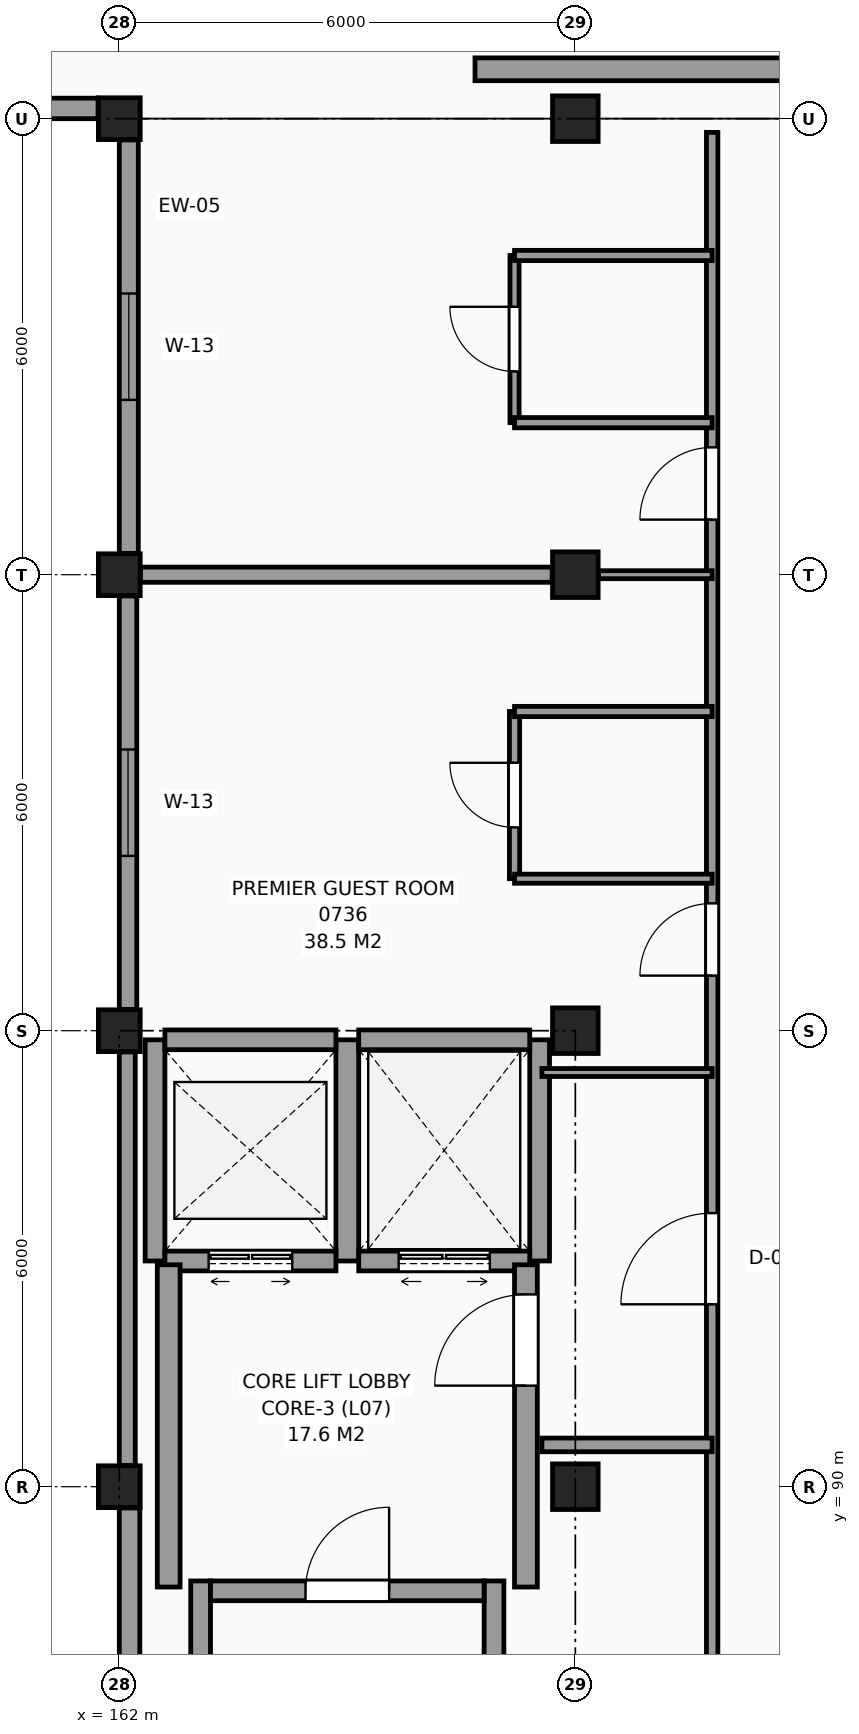
"""IFC4 building model, lengths in metres.
Left out: names, types, materials, properties, quantities, classifications, styles, units other than length and angle.
Written with IfcOpenShell. Run it as: python <this file> out.ifc"""

import sys

from ifc_helpers import new_model, si_unit, direction, frame, frame_2d, origin, origin_2d, place, context, subcontext, project, spatial, rectangle, extrude, element, fill, save


model = new_model("IFC4")
c1 = context("Model", 3, precision=1e-05, world=origin(), true_north=direction((0.0, 1.0)))
c2 = subcontext(c1, "Body", "Model", "MODEL_VIEW")
j1 = project(units=[si_unit("LENGTHUNIT", "METRE"), si_unit("PLANEANGLEUNIT", "RADIAN")], contexts=[c1])
p1 = place(None, origin())
s1 = spatial("IfcSite", under=j1, at=p1, CompositionType="ELEMENT")
p2 = place(p1, origin())
s2 = spatial("IfcBuilding", under=s1, at=p2, CompositionType="ELEMENT")
p3 = place(p2, frame((0.0, 0.0, 31.5)))
s3 = spatial("IfcBuildingStorey", under=s2, at=p3, CompositionType="ELEMENT", Elevation=31.5)
for number, where, z_axis, x_axis in (
    (1, (162.0, 90.0, 0.0), (0.0, 0.0, 1.0), (1.0, 0.0, 0.0)),
    (2, (162.0, 96.0, 0.0), (0.0, 0.0, 1.0), (1.0, 0.0, 0.0)),
    (3, (162.0, 102.0, 0.0), (0.0, 0.0, 1.0), (1.0, 0.0, 0.0)),
    (4, (162.0, 108.0, 0.0), (0.0, 0.0, 1.0), (1.0, 0.0, 0.0)),
):
    element("IfcColumn", number, at=place(p3, frame(where, z_axis=z_axis, x_axis=x_axis)), inside=s3, PredefinedType="COLUMN", context=c2, shape_type="SweptSolid", body=[
        extrude(rectangle(XDim=0.55, YDim=0.55, at=origin_2d()), origin(), (0.0, 0.0, 1.0), 3.3),
    ])
for number, where, z_axis, x_axis in (
    (5, (168.0, 90.0, 0.0), (0.0, 0.0, 1.0), (1.0, 0.0, 0.0)),
    (6, (168.0, 96.0, 0.0), (0.0, 0.0, 1.0), (1.0, 0.0, 0.0)),
    (7, (168.0, 102.0, 0.0), (0.0, 0.0, 1.0), (1.0, 0.0, 0.0)),
    (8, (168.0, 108.0, 0.0), (0.0, 0.0, 1.0), (1.0, 0.0, 0.0)),
):
    element("IfcColumn", number, at=place(p3, frame(where, z_axis=z_axis, x_axis=x_axis)), inside=s3, PredefinedType="COLUMN", context=c2, shape_type="SweptSolid", body=[
        extrude(rectangle(XDim=0.6, YDim=0.6, at=origin_2d()), origin(), (0.0, 0.0, 1.0), 3.3),
    ])
p4 = place(p3, frame((156.305, 108.135, 0.0), z_axis=(0.0, 0.0, 1.0), x_axis=(1.0, 0.0, 0.0)))
e9 = element("IfcWall", 9, at=p4, inside=s3, PredefinedType="SOLIDWALL", context=c2, shape_type="SweptSolid", body=[
    extrude(rectangle(XDim=5.415, YDim=0.27, at=frame_2d((2.708, 0.0))), origin(), (0.0, 0.0, 1.0), 3.07),
])
p5 = place(p3, frame((162.125, 107.72, 0.0), z_axis=(0.0, 0.0, 1.0), x_axis=(0.0, -1.0, 0.0)))
e10 = element("IfcWall", 10, at=p5, inside=s3, PredefinedType="SOLIDWALL", context=c2, shape_type="SweptSolid", body=[
    extrude(rectangle(XDim=5.44, YDim=0.25, at=frame_2d((2.72, 0.0))), origin(), (0.0, 0.0, 1.0), 2.42),
])
p6 = place(p5, frame((2.02, 0.0, 0.8)))
e11 = element("IfcOpeningElement", 11, at=p6, cuts=e10, PredefinedType="OPENING", context=c2, shape_type="SweptSolid", body=[
    extrude(rectangle(XDim=1.4, YDim=1.4, at=frame_2d((0.7, 0.7))), frame((0.0, 0.135, 0.0), z_axis=(0.0, -1.0, 0.0), x_axis=(1.0, 0.0, 0.0)), (0.0, 0.0, 1.0), 0.27),
])
p7 = place(p3, frame((162.115, 101.72, 0.0), z_axis=(0.0, 0.0, 1.0), x_axis=(0.0, -1.0, 0.0)))
e12 = element("IfcWall", 12, at=p7, inside=s3, PredefinedType="SOLIDWALL", context=c2, shape_type="SweptSolid", body=[
    extrude(rectangle(XDim=5.44, YDim=0.23, at=frame_2d((2.72, 0.0))), origin(), (0.0, 0.0, 1.0), 2.42),
])
p8 = place(p7, frame((2.02, 0.0, 0.8)))
e13 = element("IfcOpeningElement", 13, at=p8, cuts=e12, PredefinedType="OPENING", context=c2, shape_type="SweptSolid", body=[
    extrude(rectangle(XDim=1.4, YDim=1.4, at=frame_2d((0.7, 0.7))), frame((0.0, 0.125, 0.0), z_axis=(0.0, -1.0, 0.0), x_axis=(1.0, 0.0, 0.0)), (0.0, 0.0, 1.0), 0.25),
])
p9 = place(p3, frame((162.105, 95.72, 0.0), z_axis=(0.0, 0.0, 1.0), x_axis=(0.0, -1.0, 0.0)))
e14 = element("IfcWall", 14, at=p9, inside=s3, PredefinedType="SOLIDWALL", context=c2, shape_type="SweptSolid", body=[
    extrude(rectangle(XDim=5.44, YDim=0.21, at=frame_2d((2.72, 0.0))), origin(), (0.0, 0.0, 1.0), 2.42),
])
p10 = place(p3, frame((162.135, 89.72, 0.0), z_axis=(0.0, 0.0, 1.0), x_axis=(0.0, -1.0, 0.0)))
e15 = element("IfcWall", 15, at=p10, inside=s3, PredefinedType="SOLIDWALL", context=c2, shape_type="SweptSolid", body=[
    extrude(rectangle(XDim=5.44, YDim=0.27, at=frame_2d((2.72, 0.0))), origin(), (0.0, 0.0, 1.0), 2.42),
])
p11 = place(p3, frame((166.68, 108.65, 0.0), z_axis=(0.0, 0.0, 1.0), x_axis=(1.0, 0.0, 0.0)))
e16 = element("IfcWall", 16, at=p11, inside=s3, PredefinedType="SHEAR", context=c2, shape_type="SweptSolid", body=[
    extrude(rectangle(XDim=4.24, YDim=0.3, at=frame_2d((2.12, 0.0))), origin(), (0.0, 0.0, 1.0), 3.3),
])
for number, where, z_axis, x_axis in (
    (17, (163.07, 78.04, 0.0), (0.0, 0.0, 1.0), (0.0, 1.0, 0.0)),
    (18, (166.93, 78.04, 0.0), (0.0, 0.0, 1.0), (0.0, 1.0, 0.0)),
):
    element("IfcWall", number, at=place(p3, frame(where, z_axis=z_axis, x_axis=x_axis)), inside=s3, PredefinedType="SHEAR", context=c2, shape_type="SweptSolid", body=[
        extrude(rectangle(XDim=10.72, YDim=0.26, at=frame_2d((5.36, 0.0))), origin(), (0.0, 0.0, 1.0), 3.3),
    ])
p12 = place(p3, frame((163.2, 88.63, 0.0), z_axis=(0.0, 0.0, 1.0), x_axis=(1.0, 0.0, 0.0)))
e19 = element("IfcWall", 19, at=p12, inside=s3, PredefinedType="SHEAR", context=c2, shape_type="SweptSolid", body=[
    extrude(rectangle(XDim=3.6, YDim=0.26, at=frame_2d((1.8, 0.0))), origin(), (0.0, 0.0, 1.0), 3.3),
])
p13 = place(p12, frame((1.25, 0.0, 0.0)))
e20 = element("IfcOpeningElement", 20, at=p13, cuts=e19, PredefinedType="OPENING", context=c2, shape_type="SweptSolid", body=[
    extrude(rectangle(XDim=1.1, YDim=2.15, at=frame_2d((0.55, 1.075))), frame((0.0, 0.14, 0.0), z_axis=(0.0, -1.0, 0.0), x_axis=(1.0, 0.0, 0.0)), (0.0, 0.0, 1.0), 0.28),
])
p14 = place(p3, frame((162.47, 92.97, 0.0), z_axis=(0.0, 0.0, 1.0), x_axis=(0.0, 1.0, 0.0)))
e21 = element("IfcWall", 21, at=p14, inside=s3, PredefinedType="SHEAR", context=c2, shape_type="SweptSolid", body=[
    extrude(rectangle(XDim=2.91, YDim=0.26, at=frame_2d((1.455, 0.0))), origin(), (0.0, 0.0, 1.0), 3.3),
])
p15 = place(p3, frame((165.0, 92.97, 0.0), z_axis=(0.0, 0.0, 1.0), x_axis=(0.0, 1.0, 0.0)))
e22 = element("IfcWall", 22, at=p15, inside=s3, PredefinedType="SHEAR", context=c2, shape_type="SweptSolid", body=[
    extrude(rectangle(XDim=2.91, YDim=0.3, at=frame_2d((1.455, 0.0))), origin(), (0.0, 0.0, 1.0), 3.3),
])
p16 = place(p3, frame((162.6, 95.88, 0.0), z_axis=(0.0, 0.0, 1.0), x_axis=(1.0, 0.0, 0.0)))
e23 = element("IfcWall", 23, at=p16, inside=s3, PredefinedType="SHEAR", context=c2, shape_type="SweptSolid", body=[
    extrude(rectangle(XDim=2.25, YDim=0.26, at=frame_2d((1.125, 0.0))), origin(), (0.0, 0.0, 1.0), 3.3),
])
p17 = place(p3, frame((162.6, 92.97, 0.0), z_axis=(0.0, 0.0, 1.0), x_axis=(1.0, 0.0, 0.0)))
e24 = element("IfcWall", 24, at=p17, inside=s3, PredefinedType="SHEAR", context=c2, shape_type="SweptSolid", body=[
    extrude(rectangle(XDim=2.25, YDim=0.26, at=frame_2d((1.125, 0.0))), origin(), (0.0, 0.0, 1.0), 3.3),
])
p18 = place(p17, frame((0.575, 0.0, 0.0)))
e25 = element("IfcOpeningElement", 25, at=p18, cuts=e24, PredefinedType="OPENING", context=c2, shape_type="SweptSolid", body=[
    extrude(rectangle(XDim=1.1, YDim=2.2, at=frame_2d((0.55, 1.1))), frame((0.0, 0.14, 0.0), z_axis=(0.0, -1.0, 0.0), x_axis=(1.0, 0.0, 0.0)), (0.0, 0.0, 1.0), 0.28),
])
p19 = place(p3, frame((167.53, 92.97, 0.0), z_axis=(0.0, 0.0, 1.0), x_axis=(0.0, 1.0, 0.0)))
e26 = element("IfcWall", 26, at=p19, inside=s3, PredefinedType="SHEAR", context=c2, shape_type="SweptSolid", body=[
    extrude(rectangle(XDim=2.91, YDim=0.26, at=frame_2d((1.455, 0.0))), origin(), (0.0, 0.0, 1.0), 3.3),
])
p20 = place(p3, frame((165.15, 95.88, 0.0), z_axis=(0.0, 0.0, 1.0), x_axis=(1.0, 0.0, 0.0)))
e27 = element("IfcWall", 27, at=p20, inside=s3, PredefinedType="SHEAR", context=c2, shape_type="SweptSolid", body=[
    extrude(rectangle(XDim=2.25, YDim=0.26, at=frame_2d((1.125, 0.0))), origin(), (0.0, 0.0, 1.0), 3.3),
])
p21 = place(p3, frame((165.15, 92.97, 0.0), z_axis=(0.0, 0.0, 1.0), x_axis=(1.0, 0.0, 0.0)))
e28 = element("IfcWall", 28, at=p21, inside=s3, PredefinedType="SHEAR", context=c2, shape_type="SweptSolid", body=[
    extrude(rectangle(XDim=2.25, YDim=0.26, at=frame_2d((1.125, 0.0))), origin(), (0.0, 0.0, 1.0), 3.3),
])
p22 = place(p21, frame((0.525, 0.0, 0.0)))
e29 = element("IfcOpeningElement", 29, at=p22, cuts=e28, PredefinedType="OPENING", context=c2, shape_type="SweptSolid", body=[
    extrude(rectangle(XDim=1.2, YDim=2.25, at=frame_2d((0.6, 1.125))), frame((0.0, 0.14, 0.0), z_axis=(0.0, -1.0, 0.0), x_axis=(1.0, 0.0, 0.0)), (0.0, 0.0, 1.0), 0.28),
])
p23 = place(p3, frame((167.35, 88.68, 0.0), z_axis=(0.0, 0.0, 1.0), x_axis=(0.0, 1.0, 0.0)))
e30 = element("IfcWall", 30, at=p23, inside=s3, PredefinedType="SHEAR", context=c2, shape_type="SweptSolid", body=[
    extrude(rectangle(XDim=4.24, YDim=0.3, at=frame_2d((2.12, 0.0))), origin(), (0.0, 0.0, 1.0), 3.3),
])
p24 = place(p23, frame((2.65, 0.0, 0.0)))
e31 = element("IfcOpeningElement", 31, at=p24, cuts=e30, PredefinedType="OPENING", context=c2, shape_type="SweptSolid", body=[
    extrude(rectangle(XDim=1.2, YDim=2.2, at=frame_2d((0.6, 1.1))), frame((0.0, 0.16, 0.0), z_axis=(0.0, -1.0, 0.0), x_axis=(1.0, 0.0, 0.0)), (0.0, 0.0, 1.0), 0.32),
])
p25 = place(p3, frame((162.65, 88.68, 0.0), z_axis=(0.0, 0.0, 1.0), x_axis=(0.0, 1.0, 0.0)))
e32 = element("IfcWall", 32, at=p25, inside=s3, PredefinedType="SHEAR", context=c2, shape_type="SweptSolid", body=[
    extrude(rectangle(XDim=4.24, YDim=0.3, at=frame_2d((2.12, 0.0))), origin(), (0.0, 0.0, 1.0), 3.3),
])
p26 = place(p3, frame((167.2, 98.0, 0.0), z_axis=(0.0, 0.0, 1.0), x_axis=(0.0, 1.0, 0.0)))
e33 = element("IfcWall", 33, at=p26, inside=s3, PredefinedType="PARTITIONING", context=c2, shape_type="SweptSolid", body=[
    extrude(rectangle(XDim=2.2, YDim=0.135, at=frame_2d((1.1, 0.0))), origin(), (0.0, 0.0, 1.0), 3.07),
])
p27 = place(p26, frame((0.675, 0.0, 0.0)))
e34 = element("IfcOpeningElement", 34, at=p27, cuts=e33, PredefinedType="OPENING", context=c2, shape_type="SweptSolid", body=[
    extrude(rectangle(XDim=0.85, YDim=2.1, at=frame_2d((0.425, 1.05))), frame((0.0, 0.078, 0.0), z_axis=(0.0, -1.0, 0.0), x_axis=(1.0, 0.0, 0.0)), (0.0, 0.0, 1.0), 0.155),
])
p28 = place(p3, frame((167.2, 104.0, 0.0), z_axis=(0.0, 0.0, 1.0), x_axis=(0.0, 1.0, 0.0)))
e35 = element("IfcWall", 35, at=p28, inside=s3, PredefinedType="PARTITIONING", context=c2, shape_type="SweptSolid", body=[
    extrude(rectangle(XDim=2.2, YDim=0.12, at=frame_2d((1.1, 0.0))), origin(), (0.0, 0.0, 1.0), 3.07),
])
p29 = place(p28, frame((0.675, 0.0, 0.0)))
e36 = element("IfcOpeningElement", 36, at=p29, cuts=e35, PredefinedType="OPENING", context=c2, shape_type="SweptSolid", body=[
    extrude(rectangle(XDim=0.85, YDim=2.1, at=frame_2d((0.425, 1.05))), frame((0.0, 0.07, 0.0), z_axis=(0.0, -1.0, 0.0), x_axis=(1.0, 0.0, 0.0)), (0.0, 0.0, 1.0), 0.14),
])
p30 = place(p3, frame((169.8, 42.255, 0.0), z_axis=(0.0, 0.0, 1.0), x_axis=(0.0, 1.0, 0.0)))
e37 = element("IfcWall", 37, at=p30, inside=s3, PredefinedType="PARTITIONING", context=c2, shape_type="SweptSolid", body=[
    extrude(rectangle(XDim=65.565, YDim=0.15, at=frame_2d((32.783, 0.0))), origin(), (0.0, 0.0, 1.0), 3.07),
])
p31 = place(p30, frame((50.145, 0.0, 0.0)))
e38 = element("IfcOpeningElement", 38, at=p31, cuts=e37, PredefinedType="OPENING", context=c2, shape_type="SweptSolid", body=[
    extrude(rectangle(XDim=1.2, YDim=2.2, at=frame_2d((0.6, 1.1))), frame((0.0, 0.085, 0.0), z_axis=(0.0, -1.0, 0.0), x_axis=(1.0, 0.0, 0.0)), (0.0, 0.0, 1.0), 0.17),
])
p32 = place(p30, frame((0.42, 0.0, 0.0)))
e39 = element("IfcOpeningElement", 39, at=p32, cuts=e37, PredefinedType="OPENING", context=c2, shape_type="SweptSolid", body=[
    extrude(rectangle(XDim=0.95, YDim=2.1, at=frame_2d((0.475, 1.05))), frame((0.0, 0.085, 0.0), z_axis=(0.0, -1.0, 0.0), x_axis=(1.0, 0.0, 0.0)), (0.0, 0.0, 1.0), 0.17),
])
p33 = place(p30, frame((6.47, 0.0, 0.0)))
e40 = element("IfcOpeningElement", 40, at=p33, cuts=e37, PredefinedType="OPENING", context=c2, shape_type="SweptSolid", body=[
    extrude(rectangle(XDim=0.95, YDim=2.1, at=frame_2d((0.475, 1.05))), frame((0.0, 0.085, 0.0), z_axis=(0.0, -1.0, 0.0), x_axis=(1.0, 0.0, 0.0)), (0.0, 0.0, 1.0), 0.17),
])
p34 = place(p30, frame((12.47, 0.0, 0.0)))
e41 = element("IfcOpeningElement", 41, at=p34, cuts=e37, PredefinedType="OPENING", context=c2, shape_type="SweptSolid", body=[
    extrude(rectangle(XDim=0.95, YDim=2.1, at=frame_2d((0.475, 1.05))), frame((0.0, 0.085, 0.0), z_axis=(0.0, -1.0, 0.0), x_axis=(1.0, 0.0, 0.0)), (0.0, 0.0, 1.0), 0.17),
])
p35 = place(p30, frame((18.47, 0.0, 0.0)))
e42 = element("IfcOpeningElement", 42, at=p35, cuts=e37, PredefinedType="OPENING", context=c2, shape_type="SweptSolid", body=[
    extrude(rectangle(XDim=0.95, YDim=2.1, at=frame_2d((0.475, 1.05))), frame((0.0, 0.085, 0.0), z_axis=(0.0, -1.0, 0.0), x_axis=(1.0, 0.0, 0.0)), (0.0, 0.0, 1.0), 0.17),
])
p36 = place(p30, frame((24.47, 0.0, 0.0)))
e43 = element("IfcOpeningElement", 43, at=p36, cuts=e37, PredefinedType="OPENING", context=c2, shape_type="SweptSolid", body=[
    extrude(rectangle(XDim=0.95, YDim=2.1, at=frame_2d((0.475, 1.05))), frame((0.0, 0.085, 0.0), z_axis=(0.0, -1.0, 0.0), x_axis=(1.0, 0.0, 0.0)), (0.0, 0.0, 1.0), 0.17),
])
p37 = place(p30, frame((30.47, 0.0, 0.0)))
e44 = element("IfcOpeningElement", 44, at=p37, cuts=e37, PredefinedType="OPENING", context=c2, shape_type="SweptSolid", body=[
    extrude(rectangle(XDim=0.95, YDim=2.1, at=frame_2d((0.475, 1.05))), frame((0.0, 0.085, 0.0), z_axis=(0.0, -1.0, 0.0), x_axis=(1.0, 0.0, 0.0)), (0.0, 0.0, 1.0), 0.17),
])
p38 = place(p30, frame((54.47, 0.0, 0.0)))
e45 = element("IfcOpeningElement", 45, at=p38, cuts=e37, PredefinedType="OPENING", context=c2, shape_type="SweptSolid", body=[
    extrude(rectangle(XDim=0.95, YDim=2.1, at=frame_2d((0.475, 1.05))), frame((0.0, 0.085, 0.0), z_axis=(0.0, -1.0, 0.0), x_axis=(1.0, 0.0, 0.0)), (0.0, 0.0, 1.0), 0.17),
])
p39 = place(p30, frame((60.47, 0.0, 0.0)))
e46 = element("IfcOpeningElement", 46, at=p39, cuts=e37, PredefinedType="OPENING", context=c2, shape_type="SweptSolid", body=[
    extrude(rectangle(XDim=0.95, YDim=2.1, at=frame_2d((0.475, 1.05))), frame((0.0, 0.085, 0.0), z_axis=(0.0, -1.0, 0.0), x_axis=(1.0, 0.0, 0.0)), (0.0, 0.0, 1.0), 0.17),
])
p40 = place(p3, frame((167.56, 90.55, 0.0), z_axis=(0.0, 0.0, 1.0), x_axis=(1.0, 0.0, 0.0)))
e47 = element("IfcWall", 47, at=p40, inside=s3, PredefinedType="PARTITIONING", context=c2, shape_type="SweptSolid", body=[
    extrude(rectangle(XDim=2.24, YDim=0.18, at=frame_2d((1.12, 0.0))), origin(), (0.0, 0.0, 1.0), 3.07),
])
p41 = place(p3, frame((167.56, 95.45, 0.0), z_axis=(0.0, 0.0, 1.0), x_axis=(1.0, 0.0, 0.0)))
e48 = element("IfcWall", 48, at=p41, inside=s3, PredefinedType="PARTITIONING", context=c2, shape_type="SweptSolid", body=[
    extrude(rectangle(XDim=2.24, YDim=0.105, at=frame_2d((1.12, 0.0))), origin(), (0.0, 0.0, 1.0), 3.07),
])
p42 = place(p3, frame((167.2, 98.0, 0.0), z_axis=(0.0, 0.0, 1.0), x_axis=(1.0, 0.0, 0.0)))
e49 = element("IfcWall", 49, at=p42, inside=s3, PredefinedType="PARTITIONING", context=c2, shape_type="SweptSolid", body=[
    extrude(rectangle(XDim=2.6, YDim=0.12, at=frame_2d((1.3, 0.0))), origin(), (0.0, 0.0, 1.0), 3.07),
])
p43 = place(p3, frame((167.2, 100.2, 0.0), z_axis=(0.0, 0.0, 1.0), x_axis=(1.0, 0.0, 0.0)))
e50 = element("IfcWall", 50, at=p43, inside=s3, PredefinedType="PARTITIONING", context=c2, shape_type="SweptSolid", body=[
    extrude(rectangle(XDim=2.6, YDim=0.135, at=frame_2d((1.3, 0.0))), origin(), (0.0, 0.0, 1.0), 3.07),
])
p44 = place(p3, frame((162.28, 102.0, 0.0), z_axis=(0.0, 0.0, 1.0), x_axis=(1.0, 0.0, 0.0)))
e51 = element("IfcWall", 51, at=p44, inside=s3, PredefinedType="PARTITIONING", context=c2, shape_type="SweptSolid", body=[
    extrude(rectangle(XDim=5.415, YDim=0.2, at=frame_2d((2.708, 0.0))), origin(), (0.0, 0.0, 1.0), 2.27),
])
p45 = place(p3, frame((168.305, 102.0, 0.0), z_axis=(0.0, 0.0, 1.0), x_axis=(1.0, 0.0, 0.0)))
e52 = element("IfcWall", 52, at=p45, inside=s3, PredefinedType="PARTITIONING", context=c2, shape_type="SweptSolid", body=[
    extrude(rectangle(XDim=1.495, YDim=0.105, at=frame_2d((0.748, 0.0))), origin(), (0.0, 0.0, 1.0), 2.37),
])
for number, where, z_axis, x_axis in (
    (53, (167.2, 104.0, 0.0), (0.0, 0.0, 1.0), (1.0, 0.0, 0.0)),
    (54, (167.2, 106.2, 0.0), (0.0, 0.0, 1.0), (1.0, 0.0, 0.0)),
):
    element("IfcWall", number, at=place(p3, frame(where, z_axis=z_axis, x_axis=x_axis)), inside=s3, PredefinedType="PARTITIONING", context=c2, shape_type="SweptSolid", body=[
        extrude(rectangle(XDim=2.6, YDim=0.135, at=frame_2d((1.3, 0.0))), origin(), (0.0, 0.0, 1.0), 3.07),
    ])
p46 = place(p8, origin())
e55 = element("IfcWindow", 55, at=p46, inside=s3, PartitioningType="SINGLE_PANEL", PredefinedType="WINDOW", context=c2, shape_type="SweptSolid", body=[
    extrude(rectangle(XDim=1.4, YDim=1.4, at=frame_2d((0.7, 0.7))), frame((0.0, 0.03, 0.0), z_axis=(0.0, -1.0, 0.0), x_axis=(1.0, 0.0, 0.0)), (0.0, 0.0, 1.0), 0.06),
])
fill(e13, e55)
p47 = place(p6, origin())
e56 = element("IfcWindow", 56, at=p47, inside=s3, PartitioningType="SINGLE_PANEL", PredefinedType="WINDOW", context=c2, shape_type="SweptSolid", body=[
    extrude(rectangle(XDim=1.4, YDim=1.4, at=frame_2d((0.7, 0.7))), frame((0.0, 0.03, 0.0), z_axis=(0.0, -1.0, 0.0), x_axis=(1.0, 0.0, 0.0)), (0.0, 0.0, 1.0), 0.06),
])
fill(e11, e56)
p48 = place(p13, origin())
e57 = element("IfcDoor", 57, at=p48, inside=s3, OperationType="SINGLE_SWING_RIGHT", PredefinedType="DOOR", context=c2, shape_type="SweptSolid", body=[
    extrude(rectangle(XDim=1.1, YDim=2.15, at=frame_2d((0.55, 1.075))), frame((0.0, 0.025, 0.0), z_axis=(0.0, -1.0, 0.0), x_axis=(1.0, 0.0, 0.0)), (0.0, 0.0, 1.0), 0.05),
])
fill(e20, e57)
p49 = place(p18, origin())
e58 = element("IfcDoor", 58, at=p49, inside=s3, OperationType="DOUBLE_DOOR_SLIDING", PredefinedType="DOOR", context=c2, shape_type="SweptSolid", body=[
    extrude(rectangle(XDim=1.1, YDim=2.2, at=frame_2d((0.55, 1.1))), frame((0.0, 0.025, 0.0), z_axis=(0.0, -1.0, 0.0), x_axis=(1.0, 0.0, 0.0)), (0.0, 0.0, 1.0), 0.05),
])
fill(e25, e58)
p50 = place(p22, origin())
e59 = element("IfcDoor", 59, at=p50, inside=s3, OperationType="DOUBLE_DOOR_SLIDING", PredefinedType="DOOR", context=c2, shape_type="SweptSolid", body=[
    extrude(rectangle(XDim=1.2, YDim=2.25, at=frame_2d((0.6, 1.125))), frame((0.0, 0.025, 0.0), z_axis=(0.0, -1.0, 0.0), x_axis=(1.0, 0.0, 0.0)), (0.0, 0.0, 1.0), 0.05),
])
fill(e29, e59)
p51 = place(p24, origin())
e60 = element("IfcDoor", 60, at=p51, inside=s3, OperationType="SINGLE_SWING_LEFT", PredefinedType="DOOR", context=c2, shape_type="SweptSolid", body=[
    extrude(rectangle(XDim=1.2, YDim=2.2, at=frame_2d((0.6, 1.1))), frame((0.0, 0.025, 0.0), z_axis=(0.0, -1.0, 0.0), x_axis=(1.0, 0.0, 0.0)), (0.0, 0.0, 1.0), 0.05),
])
fill(e31, e60)
p52 = place(p31, origin())
e61 = element("IfcDoor", 61, at=p52, inside=s3, OperationType="SINGLE_SWING_LEFT", PredefinedType="DOOR", context=c2, shape_type="SweptSolid", body=[
    extrude(rectangle(XDim=1.2, YDim=2.2, at=frame_2d((0.6, 1.1))), frame((0.0, 0.025, 0.0), z_axis=(0.0, -1.0, 0.0), x_axis=(1.0, 0.0, 0.0)), (0.0, 0.0, 1.0), 0.05),
])
fill(e38, e61)
p53 = place(p27, origin())
e62 = element("IfcDoor", 62, at=p53, inside=s3, OperationType="SINGLE_SWING_RIGHT", PredefinedType="DOOR", context=c2, shape_type="SweptSolid", body=[
    extrude(rectangle(XDim=0.85, YDim=2.1, at=frame_2d((0.425, 1.05))), frame((0.0, 0.025, 0.0), z_axis=(0.0, -1.0, 0.0), x_axis=(1.0, 0.0, 0.0)), (0.0, 0.0, 1.0), 0.05),
])
fill(e34, e62)
p54 = place(p38, origin())
e63 = element("IfcDoor", 63, at=p54, inside=s3, OperationType="SINGLE_SWING_LEFT", PredefinedType="DOOR", context=c2, shape_type="SweptSolid", body=[
    extrude(rectangle(XDim=0.95, YDim=2.1, at=frame_2d((0.475, 1.05))), frame((0.0, 0.025, 0.0), z_axis=(0.0, -1.0, 0.0), x_axis=(1.0, 0.0, 0.0)), (0.0, 0.0, 1.0), 0.05),
])
fill(e45, e63)
p55 = place(p29, origin())
e64 = element("IfcDoor", 64, at=p55, inside=s3, OperationType="SINGLE_SWING_RIGHT", PredefinedType="DOOR", context=c2, shape_type="SweptSolid", body=[
    extrude(rectangle(XDim=0.85, YDim=2.1, at=frame_2d((0.425, 1.05))), frame((0.0, 0.025, 0.0), z_axis=(0.0, -1.0, 0.0), x_axis=(1.0, 0.0, 0.0)), (0.0, 0.0, 1.0), 0.05),
])
fill(e36, e64)
p56 = place(p39, origin())
e65 = element("IfcDoor", 65, at=p56, inside=s3, OperationType="SINGLE_SWING_LEFT", PredefinedType="DOOR", context=c2, shape_type="SweptSolid", body=[
    extrude(rectangle(XDim=0.95, YDim=2.1, at=frame_2d((0.475, 1.05))), frame((0.0, 0.025, 0.0), z_axis=(0.0, -1.0, 0.0), x_axis=(1.0, 0.0, 0.0)), (0.0, 0.0, 1.0), 0.05),
])
fill(e46, e65)
save(model, sys.argv[1])
